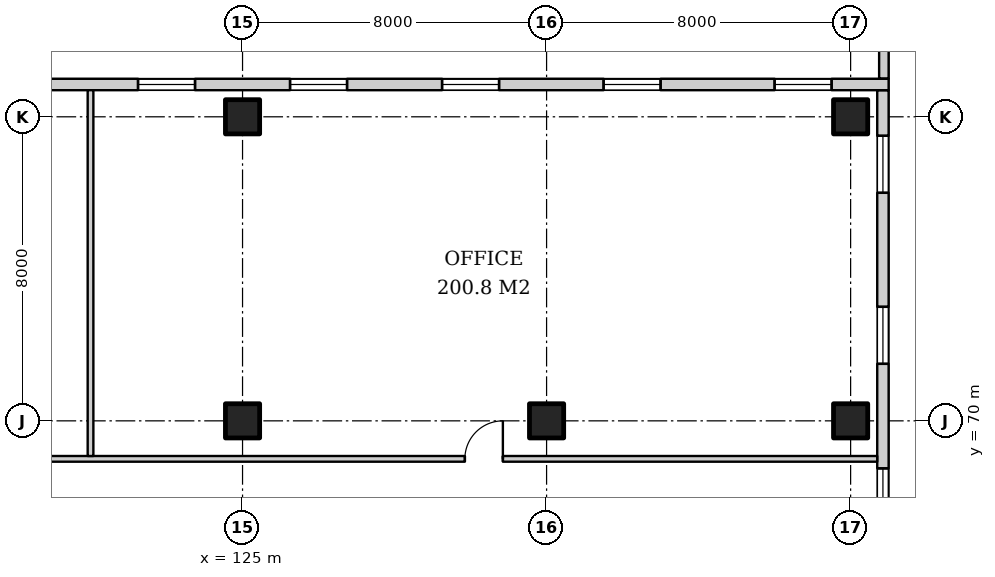
"""IFC4 building model, lengths in metres.
Left out: names, types, materials, properties, quantities, classifications, styles, units other than length and angle.
Written with IfcOpenShell. Run it as: python <this file> out.ifc"""

import sys

from ifc_helpers import new_model, si_unit, direction, frame, frame_2d, origin, origin_2d, place, context, subcontext, project, spatial, rectangle, extrude, element, fill, save


model = new_model("IFC4")
c1 = context("Model", 3, precision=1e-05, world=origin(), true_north=direction((0.0, 1.0)))
c2 = subcontext(c1, "Body", "Model", "MODEL_VIEW")
j1 = project(units=[si_unit("LENGTHUNIT", "METRE"), si_unit("PLANEANGLEUNIT", "RADIAN")], contexts=[c1])
p1 = place(None, origin())
s1 = spatial("IfcSite", under=j1, at=p1, CompositionType="ELEMENT")
p2 = place(p1, origin())
s2 = spatial("IfcBuilding", under=s1, at=p2, CompositionType="ELEMENT")
p3 = place(p2, frame((0.0, 0.0, 11.0)))
s3 = spatial("IfcBuildingStorey", under=s2, at=p3, CompositionType="ELEMENT", Elevation=11.0)
for number, where, z_axis, x_axis in (
    (1, (125.0, 70.0, 0.0), (0.0, 0.0, 1.0), (1.0, 0.0, 0.0)),
    (2, (125.0, 78.0, 0.0), (0.0, 0.0, 1.0), (1.0, 0.0, 0.0)),
    (3, (133.0, 70.0, 0.0), (0.0, 0.0, 1.0), (1.0, 0.0, 0.0)),
    (4, (141.0, 70.0, 0.0), (0.0, 0.0, 1.0), (1.0, 0.0, 0.0)),
    (5, (141.0, 78.0, 0.0), (0.0, 0.0, 1.0), (1.0, 0.0, 0.0)),
):
    element("IfcColumn", number, at=place(p3, frame(where, z_axis=z_axis, x_axis=x_axis)), inside=s3, PredefinedType="COLUMN", context=c2, shape_type="SweptSolid", body=[
        extrude(rectangle(XDim=0.9, YDim=0.9, at=origin_2d()), origin(), (0.0, 0.0, 1.0), 5.0),
    ])
p4 = place(p3, frame((141.85, 21.3, 0.0), z_axis=(0.0, 0.0, 1.0), x_axis=(0.0, 1.0, 0.0)))
e6 = element("IfcWall", 6, at=p4, inside=s3, PredefinedType="SOLIDWALL", context=c2, shape_type="SweptSolid", body=[
    extrude(rectangle(XDim=57.4, YDim=0.3, at=frame_2d((28.7, 0.0))), origin(), (0.0, 0.0, 1.0), 4.7),
])
p5 = place(p4, frame((1.2, 0.0, 0.9)))
e7 = element("IfcOpeningElement", 7, at=p5, cuts=e6, PredefinedType="OPENING", context=c2, shape_type="SweptSolid", body=[
    extrude(rectangle(XDim=1.5, YDim=3.2, at=frame_2d((0.75, 1.6))), frame((0.0, 0.16, 0.0), z_axis=(0.0, -1.0, 0.0), x_axis=(1.0, 0.0, 0.0)), (0.0, 0.0, 1.0), 0.32),
])
p6 = place(p4, frame((5.7, 0.0, 0.9)))
e8 = element("IfcOpeningElement", 8, at=p6, cuts=e6, PredefinedType="OPENING", context=c2, shape_type="SweptSolid", body=[
    extrude(rectangle(XDim=1.5, YDim=3.2, at=frame_2d((0.75, 1.6))), frame((0.0, 0.16, 0.0), z_axis=(0.0, -1.0, 0.0), x_axis=(1.0, 0.0, 0.0)), (0.0, 0.0, 1.0), 0.32),
])
p7 = place(p4, frame((9.95, 0.0, 0.9)))
e9 = element("IfcOpeningElement", 9, at=p7, cuts=e6, PredefinedType="OPENING", context=c2, shape_type="SweptSolid", body=[
    extrude(rectangle(XDim=1.5, YDim=3.2, at=frame_2d((0.75, 1.6))), frame((0.0, 0.16, 0.0), z_axis=(0.0, -1.0, 0.0), x_axis=(1.0, 0.0, 0.0)), (0.0, 0.0, 1.0), 0.32),
])
p8 = place(p4, frame((13.95, 0.0, 0.9)))
e10 = element("IfcOpeningElement", 10, at=p8, cuts=e6, PredefinedType="OPENING", context=c2, shape_type="SweptSolid", body=[
    extrude(rectangle(XDim=1.5, YDim=3.2, at=frame_2d((0.75, 1.6))), frame((0.0, 0.16, 0.0), z_axis=(0.0, -1.0, 0.0), x_axis=(1.0, 0.0, 0.0)), (0.0, 0.0, 1.0), 0.32),
])
p9 = place(p4, frame((17.95, 0.0, 0.9)))
e11 = element("IfcOpeningElement", 11, at=p9, cuts=e6, PredefinedType="OPENING", context=c2, shape_type="SweptSolid", body=[
    extrude(rectangle(XDim=1.5, YDim=3.2, at=frame_2d((0.75, 1.6))), frame((0.0, 0.16, 0.0), z_axis=(0.0, -1.0, 0.0), x_axis=(1.0, 0.0, 0.0)), (0.0, 0.0, 1.0), 0.32),
])
p10 = place(p4, frame((21.95, 0.0, 0.9)))
e12 = element("IfcOpeningElement", 12, at=p10, cuts=e6, PredefinedType="OPENING", context=c2, shape_type="SweptSolid", body=[
    extrude(rectangle(XDim=1.5, YDim=3.2, at=frame_2d((0.75, 1.6))), frame((0.0, 0.16, 0.0), z_axis=(0.0, -1.0, 0.0), x_axis=(1.0, 0.0, 0.0)), (0.0, 0.0, 1.0), 0.32),
])
p11 = place(p4, frame((25.95, 0.0, 0.9)))
e13 = element("IfcOpeningElement", 13, at=p11, cuts=e6, PredefinedType="OPENING", context=c2, shape_type="SweptSolid", body=[
    extrude(rectangle(XDim=1.5, YDim=3.2, at=frame_2d((0.75, 1.6))), frame((0.0, 0.16, 0.0), z_axis=(0.0, -1.0, 0.0), x_axis=(1.0, 0.0, 0.0)), (0.0, 0.0, 1.0), 0.32),
])
p12 = place(p4, frame((29.95, 0.0, 0.9)))
e14 = element("IfcOpeningElement", 14, at=p12, cuts=e6, PredefinedType="OPENING", context=c2, shape_type="SweptSolid", body=[
    extrude(rectangle(XDim=1.5, YDim=3.2, at=frame_2d((0.75, 1.6))), frame((0.0, 0.16, 0.0), z_axis=(0.0, -1.0, 0.0), x_axis=(1.0, 0.0, 0.0)), (0.0, 0.0, 1.0), 0.32),
])
p13 = place(p4, frame((33.95, 0.0, 0.9)))
e15 = element("IfcOpeningElement", 15, at=p13, cuts=e6, PredefinedType="OPENING", context=c2, shape_type="SweptSolid", body=[
    extrude(rectangle(XDim=1.5, YDim=3.2, at=frame_2d((0.75, 1.6))), frame((0.0, 0.16, 0.0), z_axis=(0.0, -1.0, 0.0), x_axis=(1.0, 0.0, 0.0)), (0.0, 0.0, 1.0), 0.32),
])
p14 = place(p4, frame((37.95, 0.0, 0.9)))
e16 = element("IfcOpeningElement", 16, at=p14, cuts=e6, PredefinedType="OPENING", context=c2, shape_type="SweptSolid", body=[
    extrude(rectangle(XDim=1.5, YDim=3.2, at=frame_2d((0.75, 1.6))), frame((0.0, 0.16, 0.0), z_axis=(0.0, -1.0, 0.0), x_axis=(1.0, 0.0, 0.0)), (0.0, 0.0, 1.0), 0.32),
])
p15 = place(p4, frame((41.95, 0.0, 0.9)))
e17 = element("IfcOpeningElement", 17, at=p15, cuts=e6, PredefinedType="OPENING", context=c2, shape_type="SweptSolid", body=[
    extrude(rectangle(XDim=1.5, YDim=3.2, at=frame_2d((0.75, 1.6))), frame((0.0, 0.16, 0.0), z_axis=(0.0, -1.0, 0.0), x_axis=(1.0, 0.0, 0.0)), (0.0, 0.0, 1.0), 0.32),
])
p16 = place(p4, frame((45.95, 0.0, 0.9)))
e18 = element("IfcOpeningElement", 18, at=p16, cuts=e6, PredefinedType="OPENING", context=c2, shape_type="SweptSolid", body=[
    extrude(rectangle(XDim=1.5, YDim=3.2, at=frame_2d((0.75, 1.6))), frame((0.0, 0.16, 0.0), z_axis=(0.0, -1.0, 0.0), x_axis=(1.0, 0.0, 0.0)), (0.0, 0.0, 1.0), 0.32),
])
p17 = place(p4, frame((50.2, 0.0, 0.9)))
e19 = element("IfcOpeningElement", 19, at=p17, cuts=e6, PredefinedType="OPENING", context=c2, shape_type="SweptSolid", body=[
    extrude(rectangle(XDim=1.5, YDim=3.2, at=frame_2d((0.75, 1.6))), frame((0.0, 0.16, 0.0), z_axis=(0.0, -1.0, 0.0), x_axis=(1.0, 0.0, 0.0)), (0.0, 0.0, 1.0), 0.32),
])
p18 = place(p4, frame((54.7, 0.0, 0.9)))
e20 = element("IfcOpeningElement", 20, at=p18, cuts=e6, PredefinedType="OPENING", context=c2, shape_type="SweptSolid", body=[
    extrude(rectangle(XDim=1.5, YDim=3.2, at=frame_2d((0.75, 1.6))), frame((0.0, 0.16, 0.0), z_axis=(0.0, -1.0, 0.0), x_axis=(1.0, 0.0, 0.0)), (0.0, 0.0, 1.0), 0.32),
])
p19 = place(p3, frame((142.0, 78.85, 0.0), z_axis=(0.0, 0.0, 1.0), x_axis=(-1.0, 0.0, 0.0)))
e21 = element("IfcWall", 21, at=p19, inside=s3, PredefinedType="SOLIDWALL", context=c2, shape_type="SweptSolid", body=[
    extrude(rectangle(XDim=50.0, YDim=0.3, at=frame_2d((25.0, 0.0))), origin(), (0.0, 0.0, 1.0), 4.7),
])
p20 = place(p19, frame((1.5, 0.0, 0.9)))
e22 = element("IfcOpeningElement", 22, at=p20, cuts=e21, PredefinedType="OPENING", context=c2, shape_type="SweptSolid", body=[
    extrude(rectangle(XDim=1.5, YDim=3.2, at=frame_2d((0.75, 1.6))), frame((0.0, 0.16, 0.0), z_axis=(0.0, -1.0, 0.0), x_axis=(1.0, 0.0, 0.0)), (0.0, 0.0, 1.0), 0.32),
])
p21 = place(p19, frame((6.0, 0.0, 0.9)))
e23 = element("IfcOpeningElement", 23, at=p21, cuts=e21, PredefinedType="OPENING", context=c2, shape_type="SweptSolid", body=[
    extrude(rectangle(XDim=1.5, YDim=3.2, at=frame_2d((0.75, 1.6))), frame((0.0, 0.16, 0.0), z_axis=(0.0, -1.0, 0.0), x_axis=(1.0, 0.0, 0.0)), (0.0, 0.0, 1.0), 0.32),
])
p22 = place(p19, frame((10.25, 0.0, 0.9)))
e24 = element("IfcOpeningElement", 24, at=p22, cuts=e21, PredefinedType="OPENING", context=c2, shape_type="SweptSolid", body=[
    extrude(rectangle(XDim=1.5, YDim=3.2, at=frame_2d((0.75, 1.6))), frame((0.0, 0.16, 0.0), z_axis=(0.0, -1.0, 0.0), x_axis=(1.0, 0.0, 0.0)), (0.0, 0.0, 1.0), 0.32),
])
p23 = place(p19, frame((14.25, 0.0, 0.9)))
e25 = element("IfcOpeningElement", 25, at=p23, cuts=e21, PredefinedType="OPENING", context=c2, shape_type="SweptSolid", body=[
    extrude(rectangle(XDim=1.5, YDim=3.2, at=frame_2d((0.75, 1.6))), frame((0.0, 0.16, 0.0), z_axis=(0.0, -1.0, 0.0), x_axis=(1.0, 0.0, 0.0)), (0.0, 0.0, 1.0), 0.32),
])
p24 = place(p19, frame((18.25, 0.0, 0.9)))
e26 = element("IfcOpeningElement", 26, at=p24, cuts=e21, PredefinedType="OPENING", context=c2, shape_type="SweptSolid", body=[
    extrude(rectangle(XDim=1.5, YDim=3.2, at=frame_2d((0.75, 1.6))), frame((0.0, 0.16, 0.0), z_axis=(0.0, -1.0, 0.0), x_axis=(1.0, 0.0, 0.0)), (0.0, 0.0, 1.0), 0.32),
])
p25 = place(p19, frame((22.25, 0.0, 0.9)))
e27 = element("IfcOpeningElement", 27, at=p25, cuts=e21, PredefinedType="OPENING", context=c2, shape_type="SweptSolid", body=[
    extrude(rectangle(XDim=1.5, YDim=3.2, at=frame_2d((0.75, 1.6))), frame((0.0, 0.16, 0.0), z_axis=(0.0, -1.0, 0.0), x_axis=(1.0, 0.0, 0.0)), (0.0, 0.0, 1.0), 0.32),
])
p26 = place(p19, frame((26.1, 0.0, 0.0)))
e28 = element("IfcOpeningElement", 28, at=p26, cuts=e21, PredefinedType="OPENING", context=c2, shape_type="SweptSolid", body=[
    extrude(rectangle(XDim=1.8, YDim=2.4, at=frame_2d((0.9, 1.2))), frame((0.0, 0.16, 0.0), z_axis=(0.0, -1.0, 0.0), x_axis=(1.0, 0.0, 0.0)), (0.0, 0.0, 1.0), 0.32),
])
p27 = place(p19, frame((30.25, 0.0, 0.9)))
e29 = element("IfcOpeningElement", 29, at=p27, cuts=e21, PredefinedType="OPENING", context=c2, shape_type="SweptSolid", body=[
    extrude(rectangle(XDim=1.5, YDim=3.2, at=frame_2d((0.75, 1.6))), frame((0.0, 0.16, 0.0), z_axis=(0.0, -1.0, 0.0), x_axis=(1.0, 0.0, 0.0)), (0.0, 0.0, 1.0), 0.32),
])
p28 = place(p19, frame((34.25, 0.0, 0.9)))
e30 = element("IfcOpeningElement", 30, at=p28, cuts=e21, PredefinedType="OPENING", context=c2, shape_type="SweptSolid", body=[
    extrude(rectangle(XDim=1.5, YDim=3.2, at=frame_2d((0.75, 1.6))), frame((0.0, 0.16, 0.0), z_axis=(0.0, -1.0, 0.0), x_axis=(1.0, 0.0, 0.0)), (0.0, 0.0, 1.0), 0.32),
])
p29 = place(p19, frame((38.25, 0.0, 0.9)))
e31 = element("IfcOpeningElement", 31, at=p29, cuts=e21, PredefinedType="OPENING", context=c2, shape_type="SweptSolid", body=[
    extrude(rectangle(XDim=1.5, YDim=3.2, at=frame_2d((0.75, 1.6))), frame((0.0, 0.16, 0.0), z_axis=(0.0, -1.0, 0.0), x_axis=(1.0, 0.0, 0.0)), (0.0, 0.0, 1.0), 0.32),
])
p30 = place(p19, frame((42.5, 0.0, 0.9)))
e32 = element("IfcOpeningElement", 32, at=p30, cuts=e21, PredefinedType="OPENING", context=c2, shape_type="SweptSolid", body=[
    extrude(rectangle(XDim=1.5, YDim=3.2, at=frame_2d((0.75, 1.6))), frame((0.0, 0.16, 0.0), z_axis=(0.0, -1.0, 0.0), x_axis=(1.0, 0.0, 0.0)), (0.0, 0.0, 1.0), 0.32),
])
p31 = place(p19, frame((47.0, 0.0, 0.9)))
e33 = element("IfcOpeningElement", 33, at=p31, cuts=e21, PredefinedType="OPENING", context=c2, shape_type="SweptSolid", body=[
    extrude(rectangle(XDim=1.5, YDim=3.2, at=frame_2d((0.75, 1.6))), frame((0.0, 0.16, 0.0), z_axis=(0.0, -1.0, 0.0), x_axis=(1.0, 0.0, 0.0)), (0.0, 0.0, 1.0), 0.32),
])
p32 = place(p3, frame((141.875, 79.01, 0.0), z_axis=(0.0, 0.0, 1.0), x_axis=(0.0, 1.0, 0.0)))
e34 = element("IfcWall", 34, at=p32, inside=s3, PredefinedType="PARAPET", context=c2, shape_type="SweptSolid", body=[
    extrude(rectangle(XDim=7.74, YDim=0.25, at=frame_2d((3.87, 0.0))), origin(), (0.0, 0.0, 1.0), 1.1),
])
p33 = place(p3, frame((92.3, 69.0, 0.0), z_axis=(0.0, 0.0, 1.0), x_axis=(1.0, 0.0, 0.0)))
e35 = element("IfcWall", 35, at=p33, inside=s3, PredefinedType="PARTITIONING", context=c2, shape_type="SweptSolid", body=[
    extrude(rectangle(XDim=49.4, YDim=0.15, at=frame_2d((24.7, 0.0))), origin(), (0.0, 0.0, 1.0), 3.2),
])
p34 = place(p33, frame((5.85, 0.0, 0.0)))
e36 = element("IfcOpeningElement", 36, at=p34, cuts=e35, PredefinedType="OPENING", context=c2, shape_type="SweptSolid", body=[
    extrude(rectangle(XDim=1.0, YDim=2.1, at=frame_2d((0.5, 1.05))), frame((0.0, 0.085, 0.0), z_axis=(0.0, -1.0, 0.0), x_axis=(1.0, 0.0, 0.0)), (0.0, 0.0, 1.0), 0.17),
])
p35 = place(p33, frame((20.2, 0.0, 0.0)))
e37 = element("IfcOpeningElement", 37, at=p35, cuts=e35, PredefinedType="OPENING", context=c2, shape_type="SweptSolid", body=[
    extrude(rectangle(XDim=1.0, YDim=2.1, at=frame_2d((0.5, 1.05))), frame((0.0, 0.085, 0.0), z_axis=(0.0, -1.0, 0.0), x_axis=(1.0, 0.0, 0.0)), (0.0, 0.0, 1.0), 0.17),
])
p36 = place(p33, frame((38.55, 0.0, 0.0)))
e38 = element("IfcOpeningElement", 38, at=p36, cuts=e35, PredefinedType="OPENING", context=c2, shape_type="SweptSolid", body=[
    extrude(rectangle(XDim=1.0, YDim=2.1, at=frame_2d((0.5, 1.05))), frame((0.0, 0.085, 0.0), z_axis=(0.0, -1.0, 0.0), x_axis=(1.0, 0.0, 0.0)), (0.0, 0.0, 1.0), 0.17),
])
p37 = place(p3, frame((121.0, 69.075, 0.0), z_axis=(0.0, 0.0, 1.0), x_axis=(0.0, 1.0, 0.0)))
e39 = element("IfcWall", 39, at=p37, inside=s3, PredefinedType="PARTITIONING", context=c2, shape_type="SweptSolid", body=[
    extrude(rectangle(XDim=9.625, YDim=0.15, at=frame_2d((4.812, 0.0))), origin(), (0.0, 0.0, 1.0), 3.2),
])
p38 = place(p16, origin())
e40 = element("IfcWindow", 40, at=p38, inside=s3, PartitioningType="SINGLE_PANEL", PredefinedType="WINDOW", context=c2, shape_type="SweptSolid", body=[
    extrude(rectangle(XDim=1.5, YDim=3.2, at=frame_2d((0.75, 1.6))), frame((0.0, 0.03, 0.0), z_axis=(0.0, -1.0, 0.0), x_axis=(1.0, 0.0, 0.0)), (0.0, 0.0, 1.0), 0.06),
])
fill(e18, e40)
p39 = place(p17, origin())
e41 = element("IfcWindow", 41, at=p39, inside=s3, PartitioningType="SINGLE_PANEL", PredefinedType="WINDOW", context=c2, shape_type="SweptSolid", body=[
    extrude(rectangle(XDim=1.5, YDim=3.2, at=frame_2d((0.75, 1.6))), frame((0.0, 0.03, 0.0), z_axis=(0.0, -1.0, 0.0), x_axis=(1.0, 0.0, 0.0)), (0.0, 0.0, 1.0), 0.06),
])
fill(e19, e41)
p40 = place(p18, origin())
e42 = element("IfcWindow", 42, at=p40, inside=s3, PartitioningType="SINGLE_PANEL", PredefinedType="WINDOW", context=c2, shape_type="SweptSolid", body=[
    extrude(rectangle(XDim=1.5, YDim=3.2, at=frame_2d((0.75, 1.6))), frame((0.0, 0.03, 0.0), z_axis=(0.0, -1.0, 0.0), x_axis=(1.0, 0.0, 0.0)), (0.0, 0.0, 1.0), 0.06),
])
fill(e20, e42)
p41 = place(p20, origin())
e43 = element("IfcWindow", 43, at=p41, inside=s3, PartitioningType="SINGLE_PANEL", PredefinedType="WINDOW", context=c2, shape_type="SweptSolid", body=[
    extrude(rectangle(XDim=1.5, YDim=3.2, at=frame_2d((0.75, 1.6))), frame((0.0, 0.03, 0.0), z_axis=(0.0, -1.0, 0.0), x_axis=(1.0, 0.0, 0.0)), (0.0, 0.0, 1.0), 0.06),
])
fill(e22, e43)
p42 = place(p21, origin())
e44 = element("IfcWindow", 44, at=p42, inside=s3, PartitioningType="SINGLE_PANEL", PredefinedType="WINDOW", context=c2, shape_type="SweptSolid", body=[
    extrude(rectangle(XDim=1.5, YDim=3.2, at=frame_2d((0.75, 1.6))), frame((0.0, 0.03, 0.0), z_axis=(0.0, -1.0, 0.0), x_axis=(1.0, 0.0, 0.0)), (0.0, 0.0, 1.0), 0.06),
])
fill(e23, e44)
p43 = place(p22, origin())
e45 = element("IfcWindow", 45, at=p43, inside=s3, PartitioningType="SINGLE_PANEL", PredefinedType="WINDOW", context=c2, shape_type="SweptSolid", body=[
    extrude(rectangle(XDim=1.5, YDim=3.2, at=frame_2d((0.75, 1.6))), frame((0.0, 0.03, 0.0), z_axis=(0.0, -1.0, 0.0), x_axis=(1.0, 0.0, 0.0)), (0.0, 0.0, 1.0), 0.06),
])
fill(e24, e45)
p44 = place(p23, origin())
e46 = element("IfcWindow", 46, at=p44, inside=s3, PartitioningType="SINGLE_PANEL", PredefinedType="WINDOW", context=c2, shape_type="SweptSolid", body=[
    extrude(rectangle(XDim=1.5, YDim=3.2, at=frame_2d((0.75, 1.6))), frame((0.0, 0.03, 0.0), z_axis=(0.0, -1.0, 0.0), x_axis=(1.0, 0.0, 0.0)), (0.0, 0.0, 1.0), 0.06),
])
fill(e25, e46)
p45 = place(p24, origin())
e47 = element("IfcWindow", 47, at=p45, inside=s3, PartitioningType="SINGLE_PANEL", PredefinedType="WINDOW", context=c2, shape_type="SweptSolid", body=[
    extrude(rectangle(XDim=1.5, YDim=3.2, at=frame_2d((0.75, 1.6))), frame((0.0, 0.03, 0.0), z_axis=(0.0, -1.0, 0.0), x_axis=(1.0, 0.0, 0.0)), (0.0, 0.0, 1.0), 0.06),
])
fill(e26, e47)
p46 = place(p36, origin())
e48 = element("IfcDoor", 48, at=p46, inside=s3, OperationType="SINGLE_SWING_RIGHT", PredefinedType="DOOR", context=c2, shape_type="SweptSolid", body=[
    extrude(rectangle(XDim=1.0, YDim=2.1, at=frame_2d((0.5, 1.05))), frame((0.0, 0.025, 0.0), z_axis=(0.0, -1.0, 0.0), x_axis=(1.0, 0.0, 0.0)), (0.0, 0.0, 1.0), 0.05),
])
fill(e38, e48)
save(model, sys.argv[1])
